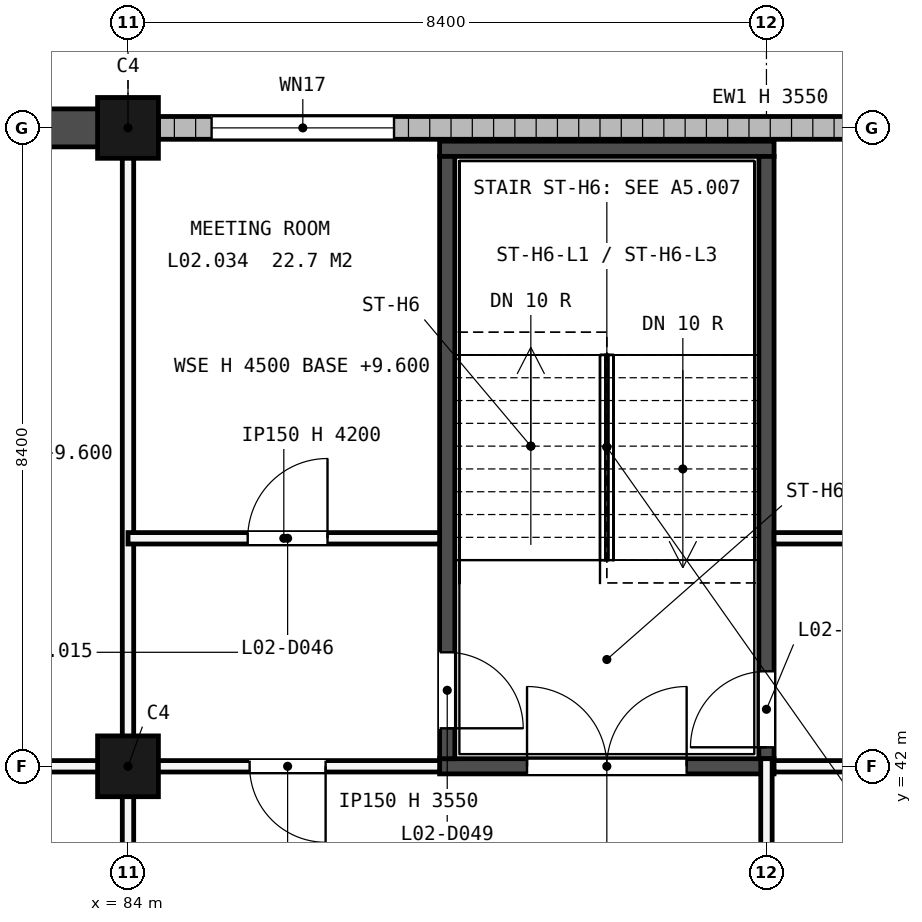
"""IFC4 building model, lengths in metres.
Left out: names, types, materials, properties, quantities, classifications, styles, units other than length and angle.
Written with IfcOpenShell. Run it as: python <this file> out.ifc"""

import sys

from ifc_helpers import new_model, si_unit, direction, frame, frame_2d, origin, origin_2d, place, context, subcontext, project, spatial, rectangle, extrude, element, fill, save


model = new_model("IFC4")
c1 = context("Model", 3, precision=1e-05, world=origin(), true_north=direction((0.0, 1.0)))
c2 = subcontext(c1, "Body", "Model", "MODEL_VIEW")
j1 = project(units=[si_unit("LENGTHUNIT", "METRE"), si_unit("PLANEANGLEUNIT", "RADIAN")], contexts=[c1])
p1 = place(None, origin())
s1 = spatial("IfcSite", under=j1, at=p1, CompositionType="ELEMENT")
p2 = place(p1, origin())
s2 = spatial("IfcBuilding", under=s1, at=p2, CompositionType="ELEMENT")
p3 = place(p2, frame((0.0, 0.0, 9.9)))
s3 = spatial("IfcBuildingStorey", under=s2, at=p3, CompositionType="ELEMENT", Elevation=9.9)
for number, where, z_axis, x_axis in (
    (1, (84.0, 42.0, -0.25), (0.0, 0.0, 1.0), (1.0, 0.0, 0.0)),
    (2, (84.0, 50.4, -0.25), (0.0, 0.0, 1.0), (1.0, 0.0, 0.0)),
):
    element("IfcColumn", number, at=place(p3, frame(where, z_axis=z_axis, x_axis=x_axis)), inside=s3, PredefinedType="COLUMN", context=c2, shape_type="SweptSolid", body=[
        extrude(rectangle(XDim=0.8, YDim=0.8, at=origin_2d()), origin(), (0.0, 0.0, 1.0), 4.45),
    ])
p4 = place(p3, frame((42.0, 50.4, -0.25), z_axis=(0.0, 0.0, 1.0), x_axis=(1.0, 0.0, 0.0)))
e3 = element("IfcWall", 3, at=p4, inside=s3, PredefinedType="SHEAR", context=c2, shape_type="SweptSolid", body=[
    extrude(rectangle(XDim=42.0, YDim=0.5, at=frame_2d((21.0, 0.0))), origin(), (0.0, 0.0, 1.0), 4.45),
])
p5 = place(p3, frame((84.4, 50.4, 0.0), z_axis=(0.0, 0.0, 1.0), x_axis=(1.0, 0.0, 0.0)))
e4 = element("IfcWall", 4, at=p5, inside=s3, PredefinedType="STANDARD", context=c2, shape_type="SweptSolid", body=[
    extrude(rectangle(XDim=16.1, YDim=0.3, at=frame_2d((8.05, 0.0))), origin(), (0.0, 0.0, 1.0), 3.55),
])
p6 = place(p5, frame((0.7, 0.0, 0.9)))
e5 = element("IfcOpeningElement", 5, at=p6, cuts=e4, PredefinedType="OPENING", context=c2, shape_type="SweptSolid", body=[
    extrude(rectangle(XDim=2.4, YDim=1.5, at=frame_2d((1.2, 0.75))), frame((0.0, 0.16, 0.0), z_axis=(0.0, -1.0, 0.0), x_axis=(1.0, 0.0, 0.0)), (0.0, 0.0, 1.0), 0.32),
])
p7 = place(p5, frame((9.95, 0.0, 0.9)))
e6 = element("IfcOpeningElement", 6, at=p7, cuts=e4, PredefinedType="OPENING", context=c2, shape_type="SweptSolid", body=[
    extrude(rectangle(XDim=4.2, YDim=1.5, at=frame_2d((2.1, 0.75))), frame((0.0, 0.16, 0.0), z_axis=(0.0, -1.0, 0.0), x_axis=(1.0, 0.0, 0.0)), (0.0, 0.0, 1.0), 0.32),
])
p8 = place(p3, frame((88.1, 42.0, -0.3), z_axis=(0.0, 0.0, 1.0), x_axis=(1.0, 0.0, 0.0)))
e7 = element("IfcWall", 7, at=p8, inside=s3, PredefinedType="SHEAR", context=c2, shape_type="SweptSolid", body=[
    extrude(rectangle(XDim=4.4, YDim=0.2, at=frame_2d((2.2, 0.0))), origin(), (0.0, 0.0, 1.0), 4.5),
])
p9 = place(p8, frame((1.15, 0.0, 0.3)))
e8 = element("IfcOpeningElement", 8, at=p9, cuts=e7, PredefinedType="OPENING", context=c2, shape_type="SweptSolid", body=[
    extrude(rectangle(XDim=2.1, YDim=2.1, at=frame_2d((1.05, 1.05))), frame((0.0, 0.11, 0.0), z_axis=(0.0, -1.0, 0.0), x_axis=(1.0, 0.0, 0.0)), (0.0, 0.0, 1.0), 0.22),
])
p10 = place(p3, frame((88.1, 50.125, -0.3), z_axis=(0.0, 0.0, 1.0), x_axis=(1.0, 0.0, 0.0)))
e9 = element("IfcWall", 9, at=p10, inside=s3, PredefinedType="SHEAR", context=c2, shape_type="SweptSolid", body=[
    extrude(rectangle(XDim=4.4, YDim=0.2, at=frame_2d((2.2, 0.0))), origin(), (0.0, 0.0, 1.0), 4.5),
])
p11 = place(p3, frame((88.2, 42.1, -0.3), z_axis=(0.0, 0.0, 1.0), x_axis=(0.0, 1.0, 0.0)))
e10 = element("IfcWall", 10, at=p11, inside=s3, PredefinedType="SHEAR", context=c2, shape_type="SweptSolid", body=[
    extrude(rectangle(XDim=7.925, YDim=0.2, at=frame_2d((3.962, 0.0))), origin(), (0.0, 0.0, 1.0), 4.5),
])
p12 = place(p11, frame((0.4, 0.0, 0.3)))
e11 = element("IfcOpeningElement", 11, at=p12, cuts=e10, PredefinedType="OPENING", context=c2, shape_type="SweptSolid", body=[
    extrude(rectangle(XDim=1.0, YDim=2.1, at=frame_2d((0.5, 1.05))), frame((0.0, 0.11, 0.0), z_axis=(0.0, -1.0, 0.0), x_axis=(1.0, 0.0, 0.0)), (0.0, 0.0, 1.0), 0.22),
])
p13 = place(p3, frame((92.4, 42.1, -0.3), z_axis=(0.0, 0.0, 1.0), x_axis=(0.0, 1.0, 0.0)))
e12 = element("IfcWall", 12, at=p13, inside=s3, PredefinedType="SHEAR", context=c2, shape_type="SweptSolid", body=[
    extrude(rectangle(XDim=7.925, YDim=0.2, at=frame_2d((3.962, 0.0))), origin(), (0.0, 0.0, 1.0), 4.5),
])
p14 = place(p13, frame((0.15, 0.0, 0.3)))
e13 = element("IfcOpeningElement", 13, at=p14, cuts=e12, PredefinedType="OPENING", context=c2, shape_type="SweptSolid", body=[
    extrude(rectangle(XDim=1.0, YDim=2.1, at=frame_2d((0.5, 1.05))), frame((0.0, 0.11, 0.0), z_axis=(0.0, -1.0, 0.0), x_axis=(1.0, 0.0, 0.0)), (0.0, 0.0, 1.0), 0.22),
])
p15 = place(p3, frame((42.1, 42.0, -0.3), z_axis=(0.0, 0.0, 1.0), x_axis=(1.0, 0.0, 0.0)))
e14 = element("IfcWall", 14, at=p15, inside=s3, PredefinedType="PARTITIONING", context=c2, shape_type="SweptSolid", body=[
    extrude(rectangle(XDim=41.9, YDim=0.15, at=frame_2d((20.95, 0.0))), origin(), (0.0, 0.0, 1.0), 4.5),
])
p16 = place(p3, frame((84.0, 42.075, -0.3), z_axis=(0.0, 0.0, 1.0), x_axis=(0.0, 1.0, 0.0)))
e15 = element("IfcWall", 15, at=p16, inside=s3, PredefinedType="PARTITIONING", context=c2, shape_type="SweptSolid", body=[
    extrude(rectangle(XDim=8.075, YDim=0.15, at=frame_2d((4.038, 0.0))), origin(), (0.0, 0.0, 1.0), 3.7),
])
p17 = place(p3, frame((84.0, 37.8, -0.3), z_axis=(0.0, 0.0, 1.0), x_axis=(0.0, 1.0, 0.0)))
e16 = element("IfcWall", 16, at=p17, inside=s3, PredefinedType="PARTITIONING", context=c2, shape_type="SweptSolid", body=[
    extrude(rectangle(XDim=4.125, YDim=0.15, at=frame_2d((2.062, 0.0))), origin(), (0.0, 0.0, 1.0), 3.7),
])
p18 = place(p3, frame((84.0, 42.0, 0.0), z_axis=(0.0, 0.0, 1.0), x_axis=(1.0, 0.0, 0.0)))
e17 = element("IfcWall", 17, at=p18, inside=s3, PredefinedType="PARTITIONING", context=c2, shape_type="SweptSolid", body=[
    extrude(rectangle(XDim=4.1, YDim=0.15, at=frame_2d((2.05, 0.0))), origin(), (0.0, 0.0, 1.0), 3.55),
])
p19 = place(p18, frame((1.6, 0.0, 0.0)))
e18 = element("IfcOpeningElement", 18, at=p19, cuts=e17, PredefinedType="OPENING", context=c2, shape_type="SweptSolid", body=[
    extrude(rectangle(XDim=1.0, YDim=2.1, at=frame_2d((0.5, 1.05))), frame((0.0, 0.085, 0.0), z_axis=(0.0, -1.0, 0.0), x_axis=(1.0, 0.0, 0.0)), (0.0, 0.0, 1.0), 0.17),
])
p20 = place(p3, frame((92.5, 42.0, 0.0), z_axis=(0.0, 0.0, 1.0), x_axis=(1.0, 0.0, 0.0)))
e19 = element("IfcWall", 19, at=p20, inside=s3, PredefinedType="PARTITIONING", context=c2, shape_type="SweptSolid", body=[
    extrude(rectangle(XDim=8.58, YDim=0.15, at=frame_2d((4.29, 0.0))), origin(), (0.0, 0.0, 1.0), 4.2),
])
p21 = place(p3, frame((84.0, 45.0, 0.0), z_axis=(0.0, 0.0, 1.0), x_axis=(1.0, 0.0, 0.0)))
e20 = element("IfcWall", 20, at=p21, inside=s3, PredefinedType="PARTITIONING", context=c2, shape_type="SweptSolid", body=[
    extrude(rectangle(XDim=4.1, YDim=0.15, at=frame_2d((2.05, 0.0))), origin(), (0.0, 0.0, 1.0), 4.2),
])
p22 = place(p21, frame((1.575, 0.0, 0.0)))
e21 = element("IfcOpeningElement", 21, at=p22, cuts=e20, PredefinedType="OPENING", context=c2, shape_type="SweptSolid", body=[
    extrude(rectangle(XDim=1.05, YDim=2.1, at=frame_2d((0.525, 1.05))), frame((0.0, 0.085, 0.0), z_axis=(0.0, -1.0, 0.0), x_axis=(1.0, 0.0, 0.0)), (0.0, 0.0, 1.0), 0.17),
])
p23 = place(p3, frame((92.5, 45.0, 0.0), z_axis=(0.0, 0.0, 1.0), x_axis=(1.0, 0.0, 0.0)))
e22 = element("IfcWall", 22, at=p23, inside=s3, PredefinedType="PARTITIONING", context=c2, shape_type="SweptSolid", body=[
    extrude(rectangle(XDim=20.8, YDim=0.15, at=frame_2d((10.4, 0.0))), origin(), (0.0, 0.0, 1.0), 4.2),
])
p24 = place(p23, frame((9.9, 0.0, 0.0)))
e23 = element("IfcOpeningElement", 23, at=p24, cuts=e22, PredefinedType="OPENING", context=c2, shape_type="SweptSolid", body=[
    extrude(rectangle(XDim=1.0, YDim=2.1, at=frame_2d((0.5, 1.05))), frame((0.0, 0.085, 0.0), z_axis=(0.0, -1.0, 0.0), x_axis=(1.0, 0.0, 0.0)), (0.0, 0.0, 1.0), 0.17),
])
p25 = place(p3, frame((92.4, 33.32, 0.0), z_axis=(0.0, 0.0, 1.0), x_axis=(0.0, 1.0, 0.0)))
e24 = element("IfcWall", 24, at=p25, inside=s3, PredefinedType="PARTITIONING", context=c2, shape_type="SweptSolid", body=[
    extrude(rectangle(XDim=8.78, YDim=0.15, at=frame_2d((4.39, 0.0))), origin(), (0.0, 0.0, 1.0), 4.2),
])
p26 = place(p6, origin())
e25 = element("IfcWindow", 25, at=p26, inside=s3, PartitioningType="SINGLE_PANEL", PredefinedType="WINDOW", context=c2, shape_type="SweptSolid", body=[
    extrude(rectangle(XDim=2.4, YDim=1.5, at=frame_2d((1.2, 0.75))), frame((0.0, 0.03, 0.0), z_axis=(0.0, -1.0, 0.0), x_axis=(1.0, 0.0, 0.0)), (0.0, 0.0, 1.0), 0.06),
])
fill(e5, e25)
p27 = place(p9, origin())
e26 = element("IfcDoor", 26, at=p27, inside=s3, OperationType="DOUBLE_DOOR_SINGLE_SWING", PredefinedType="DOOR", context=c2, shape_type="SweptSolid", body=[
    extrude(rectangle(XDim=2.1, YDim=2.1, at=frame_2d((1.05, 1.05))), frame((0.0, 0.025, 0.0), z_axis=(0.0, -1.0, 0.0), x_axis=(1.0, 0.0, 0.0)), (0.0, 0.0, 1.0), 0.05),
])
fill(e8, e26)
p28 = place(p14, origin())
e27 = element("IfcDoor", 27, at=p28, inside=s3, OperationType="SINGLE_SWING_RIGHT", PredefinedType="DOOR", context=c2, shape_type="SweptSolid", body=[
    extrude(rectangle(XDim=1.0, YDim=2.1, at=frame_2d((0.5, 1.05))), frame((0.0, 0.025, 0.0), z_axis=(0.0, -1.0, 0.0), x_axis=(1.0, 0.0, 0.0)), (0.0, 0.0, 1.0), 0.05),
])
fill(e13, e27)
p29 = place(p22, origin())
e28 = element("IfcDoor", 28, at=p29, inside=s3, OperationType="SINGLE_SWING_LEFT", PredefinedType="DOOR", context=c2, shape_type="SweptSolid", body=[
    extrude(rectangle(XDim=1.05, YDim=2.1, at=frame_2d((0.525, 1.05))), frame((0.0, 0.025, 0.0), z_axis=(0.0, -1.0, 0.0), x_axis=(1.0, 0.0, 0.0)), (0.0, 0.0, 1.0), 0.05),
])
fill(e21, e28)
p30 = place(p19, origin())
e29 = element("IfcDoor", 29, at=p30, inside=s3, OperationType="SINGLE_SWING_RIGHT", PredefinedType="DOOR", context=c2, shape_type="SweptSolid", body=[
    extrude(rectangle(XDim=1.0, YDim=2.1, at=frame_2d((0.5, 1.05))), frame((0.0, 0.025, 0.0), z_axis=(0.0, -1.0, 0.0), x_axis=(1.0, 0.0, 0.0)), (0.0, 0.0, 1.0), 0.05),
])
fill(e18, e29)
p31 = place(p12, origin())
e30 = element("IfcDoor", 30, at=p31, inside=s3, OperationType="SINGLE_SWING_LEFT", PredefinedType="DOOR", context=c2, shape_type="SweptSolid", body=[
    extrude(rectangle(XDim=1.0, YDim=2.1, at=frame_2d((0.5, 1.05))), frame((0.0, 0.025, 0.0), z_axis=(0.0, -1.0, 0.0), x_axis=(1.0, 0.0, 0.0)), (0.0, 0.0, 1.0), 0.05),
])
fill(e11, e30)
save(model, sys.argv[1])
